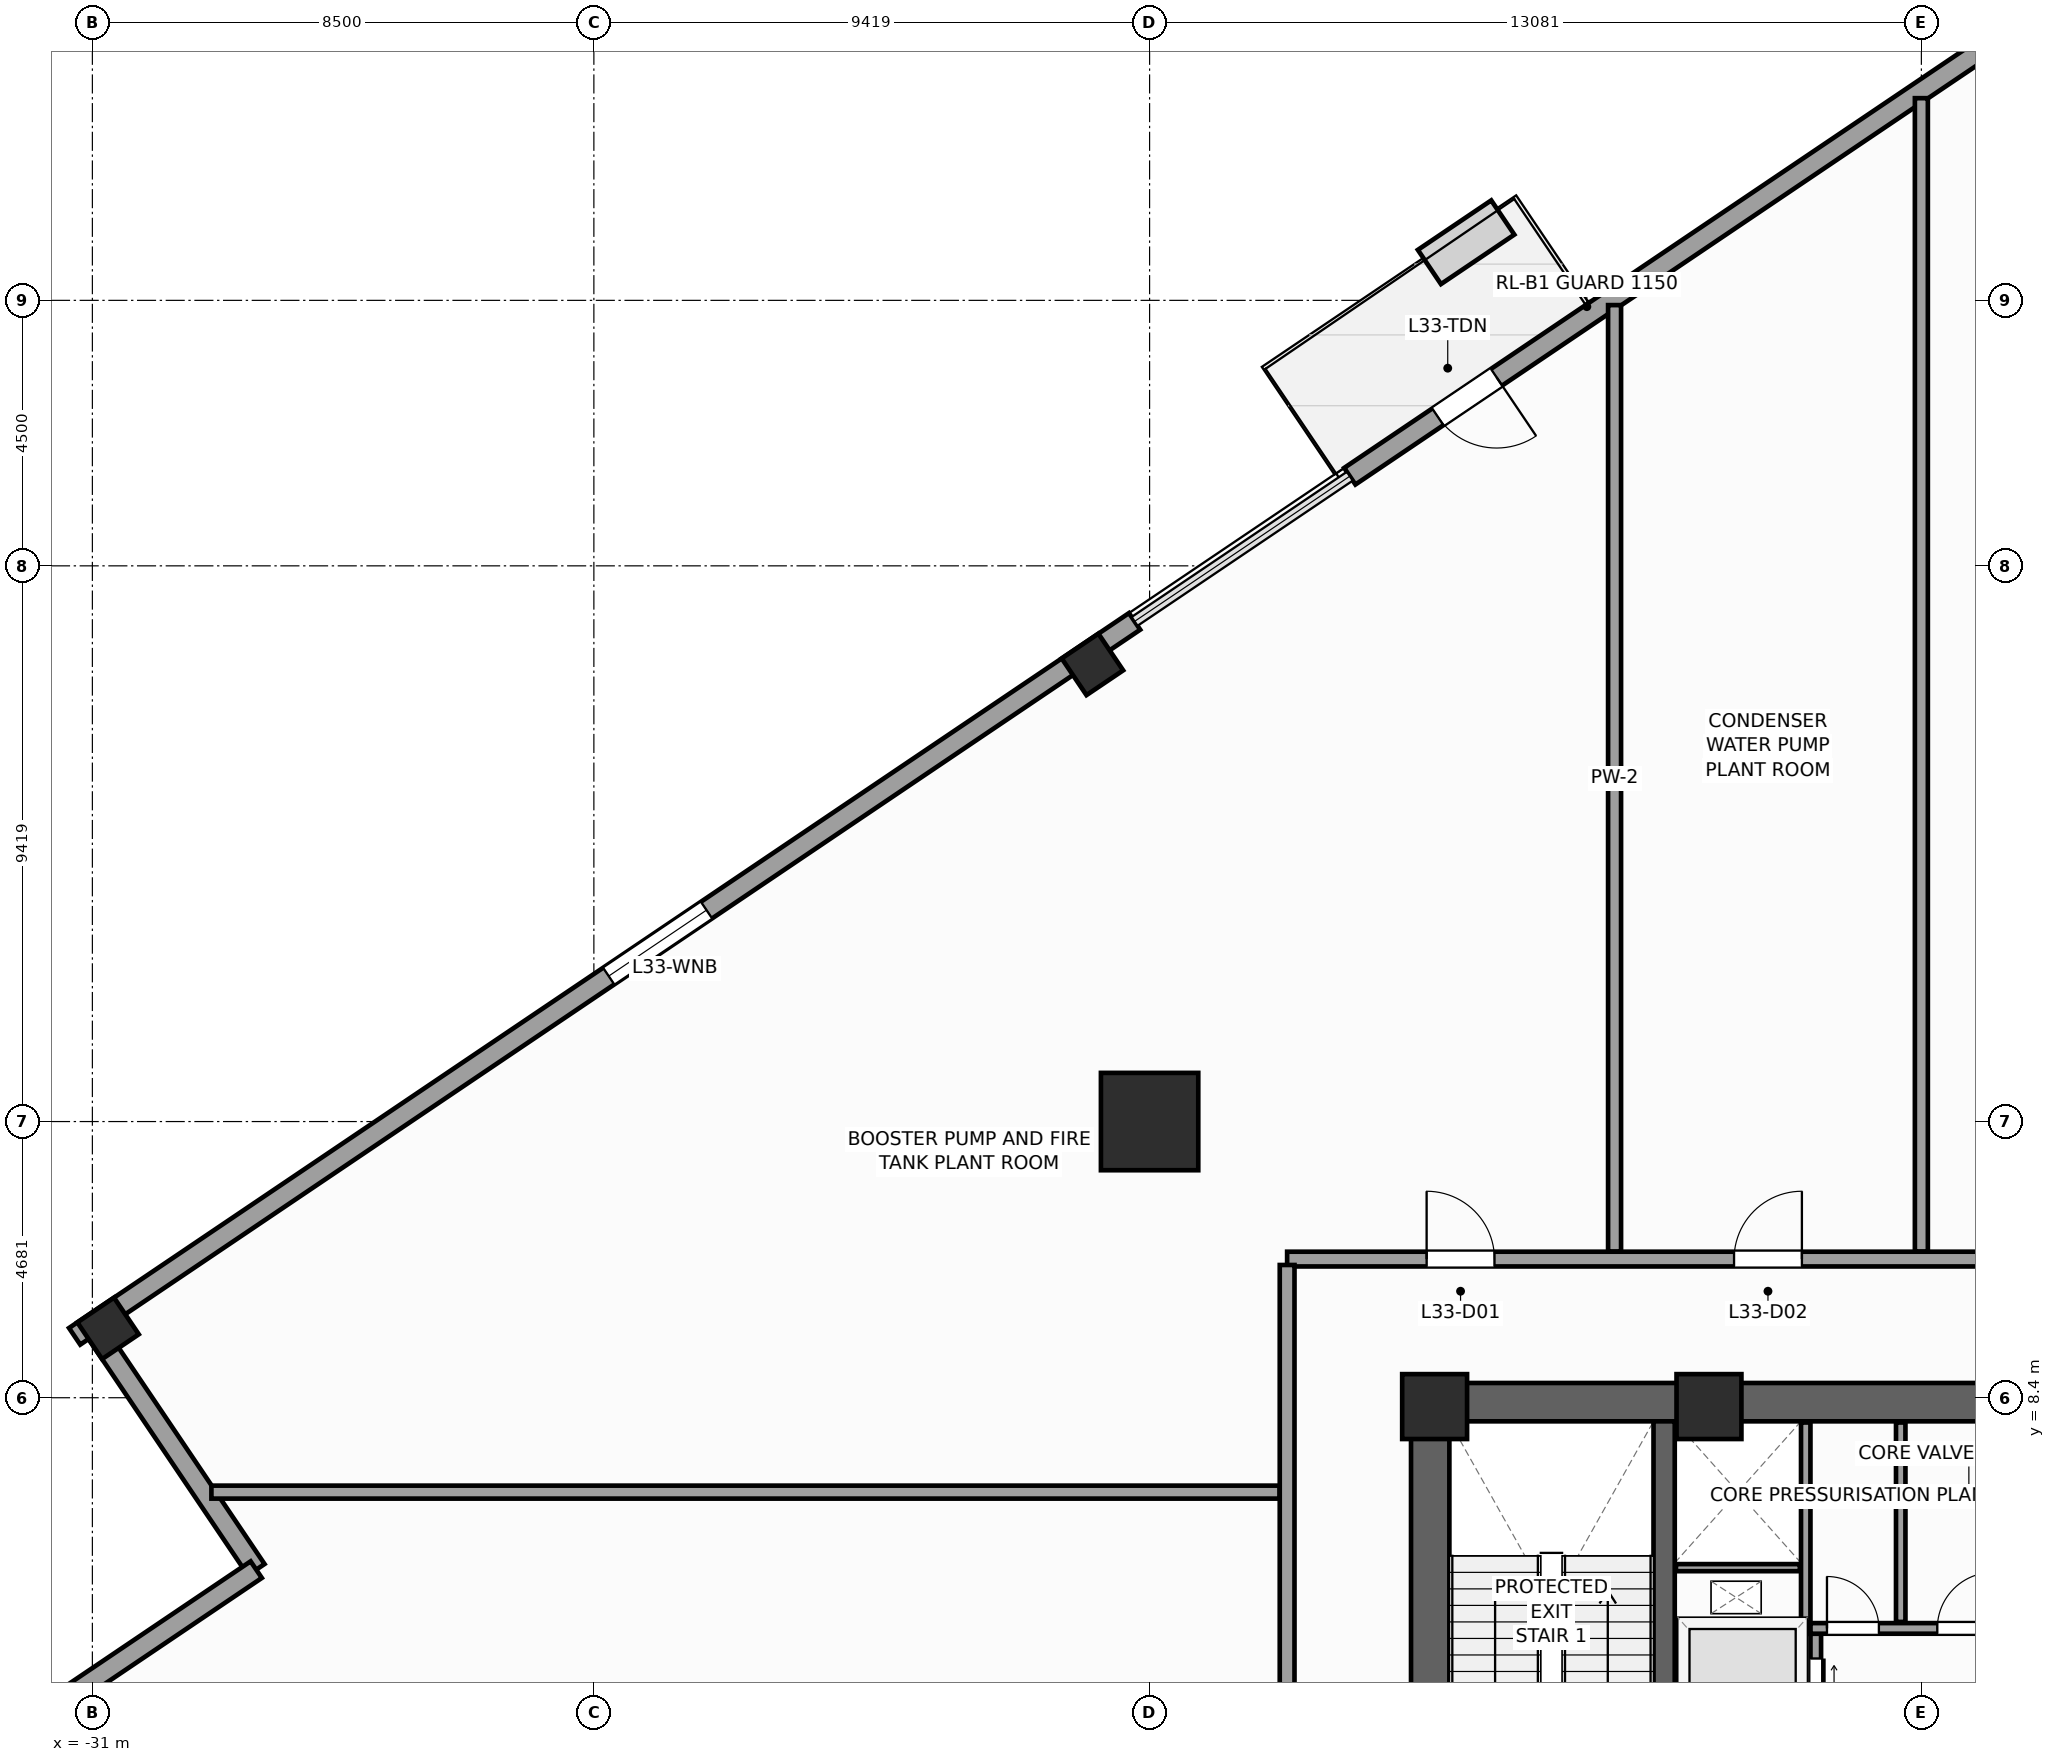
"""IFC4 building model, lengths in metres.
Left out: names, types, materials, properties, quantities, classifications, styles, units other than length and angle.
Written with IfcOpenShell. Run it as: python <this file> out.ifc"""

import sys

from ifc_helpers import new_model, si_unit, direction, frame, frame_2d, origin, origin_2d, place, context, subcontext, project, spatial, rectangle, extrude, source, transform, mapped, element, fill, save


model = new_model("IFC4")
c1 = context("Model", 3, precision=1e-05, world=origin(), true_north=direction((0.0, 1.0)))
c2 = subcontext(c1, "Body", "Model", "MODEL_VIEW")
j1 = project(units=[si_unit("LENGTHUNIT", "METRE"), si_unit("PLANEANGLEUNIT", "RADIAN")], contexts=[c1])
p1 = place(None, origin())
s1 = spatial("IfcSite", under=j1, at=p1, CompositionType="ELEMENT")
p2 = place(p1, origin())
s2 = spatial("IfcBuilding", under=s1, at=p2, CompositionType="ELEMENT")
p3 = place(p2, frame((0.0, 0.0, 139.2)))
s3 = spatial("IfcBuildingStorey", under=s2, at=p3, CompositionType="ELEMENT", Elevation=139.2)
p4 = place(p3, frame((-8.65, 8.325, 0.0), z_axis=(0.0, 0.0, 1.0), x_axis=(1.0, 0.0, 0.0)))
e1 = element("IfcWall", 1, at=p4, inside=s3, PredefinedType="SHEAR", context=c2, shape_type="SweptSolid", body=[
    extrude(rectangle(XDim=17.3, YDim=0.65, at=frame_2d((8.65, 0.0))), origin(), (0.0, 0.0, 1.0), 5.2),
])
p5 = place(p3, frame((-8.325, -8.0, 0.0), z_axis=(0.0, 0.0, 1.0), x_axis=(0.0, 1.0, 0.0)))
e2 = element("IfcWall", 2, at=p5, inside=s3, PredefinedType="SHEAR", context=c2, shape_type="SweptSolid", body=[
    extrude(rectangle(XDim=16.0, YDim=0.65, at=frame_2d((8.0, 0.0))), origin(), (0.0, 0.0, 1.0), 5.2),
])
p6 = place(p5, frame((4.69, 0.0, 0.0)))
e3 = element("IfcOpeningElement", 3, at=p6, cuts=e2, PredefinedType="OPENING", context=c2, shape_type="SweptSolid", body=[
    extrude(rectangle(XDim=1.3, YDim=2.2, at=frame_2d((0.65, 1.1))), frame((0.0, 0.335, 0.0), z_axis=(0.0, -1.0, 0.0), x_axis=(1.0, 0.0, 0.0)), (0.0, 0.0, 1.0), 0.67),
])
p7 = place(p3, frame((-4.36, -8.0, 0.0), z_axis=(0.0, 0.0, 1.0), x_axis=(0.0, 1.0, 0.0)))
e4 = element("IfcWall", 4, at=p7, inside=s3, PredefinedType="SHEAR", context=c2, shape_type="SweptSolid", body=[
    extrude(rectangle(XDim=16.0, YDim=0.36, at=frame_2d((8.0, 0.0))), origin(), (0.0, 0.0, 1.0), 5.2),
])
m1 = source(origin(), c2, "Body", "SweptSolid", [
    extrude(rectangle(XDim=1.1, YDim=1.1, at=origin_2d()), origin(), (0.0, 0.0, 1.0), 5.2),
])
for number, where, z_axis, x_axis in (
    (5, (-8.25, 8.25, 0.0), (0.0, 0.0, 1.0), (1.0, 0.0, 0.0)),
    (6, (-3.6, 8.25, 0.0), (0.0, 0.0, 1.0), (1.0, 0.0, 0.0)),
):
    element("IfcColumn", number, at=place(p3, frame(where, z_axis=z_axis, x_axis=x_axis)), inside=s3, PredefinedType="PILASTER", context=c2, shape_type="MappedRepresentation", body=[
        mapped(m1, transform((0.0, 0.0, 0.0), scale=1.0)),
    ])
m2 = source(origin(), c2, "Body", "SweptSolid", [
    extrude(rectangle(XDim=1.65, YDim=1.65, at=origin_2d()), origin(), (0.0, 0.0, 1.0), 5.2),
])
p8 = place(p3, frame((-13.081, 13.081, 0.0), z_axis=(0.0, 0.0, 1.0), x_axis=(1.0, 0.0, 0.0)))
e7 = element("IfcColumn", 7, at=p8, inside=s3, PredefinedType="COLUMN", context=c2, shape_type="MappedRepresentation", body=[
    mapped(m2, transform((0.0, 0.0, 0.0), scale=1.0)),
])
m3 = source(origin(), c2, "Body", "SweptSolid", [
    extrude(rectangle(XDim=0.75, YDim=0.75, at=origin_2d()), origin(), (0.0, 0.0, 1.0), 5.2),
])
for number, where, z_axis, x_axis in (
    (8, (-14.05, 20.83, 0.0), (0.0, 0.0, 1.0), (0.829, 0.559, 0.0)),
    (9, (-30.734, 9.576, 0.0), (0.0, 0.0, 1.0), (0.829, 0.559, 0.0)),
):
    element("IfcColumn", number, at=place(p3, frame(where, z_axis=z_axis, x_axis=x_axis)), inside=s3, PredefinedType="COLUMN", context=c2, shape_type="MappedRepresentation", body=[
        mapped(m3, transform((0.0, 0.0, 0.0), scale=1.0)),
    ])
p9 = place(p3, frame((-31.019, 9.631, 0.0), z_axis=(0.0, 0.0, 1.0), x_axis=(0.559210350234, -0.829025804298, 0.0)))
e10 = element("IfcWall", 10, at=p9, inside=s3, PredefinedType="STANDARD", context=c2, shape_type="SweptSolid", body=[
    extrude(rectangle(XDim=5.0, YDim=0.34, at=frame_2d((2.5, 0.0))), origin(), (0.0, 0.0, 1.0), 4.94),
])
p10 = place(p3, frame((-28.223, 5.486, 0.0), z_axis=(0.0, 0.0, 1.0), x_axis=(-0.82905227345, -0.559171107879, 0.0)))
e11 = element("IfcWall", 11, at=p10, inside=s3, PredefinedType="STANDARD", context=c2, shape_type="SweptSolid", body=[
    extrude(rectangle(XDim=5.17, YDim=0.34, at=frame_2d((2.585, 0.0))), origin(), (0.0, 0.0, 1.0), 4.24),
])
p11 = place(p3, frame((2.972, 32.558, 0.0), z_axis=(0.0, 0.0, 1.0), x_axis=(-0.82903231094, -0.559200704056, 0.0)))
e12 = element("IfcWall", 12, at=p11, inside=s3, PredefinedType="STANDARD", context=c2, shape_type="SweptSolid", body=[
    extrude(rectangle(XDim=15.27, YDim=0.34, at=frame_2d((7.635, 0.0))), origin(), (0.0, 0.0, 1.0), 4.34),
])
p12 = place(p11, frame((12.27, 0.0, 0.0)))
e13 = element("IfcOpeningElement", 13, at=p12, cuts=e12, PredefinedType="OPENING", context=c2, shape_type="SweptSolid", body=[
    extrude(rectangle(XDim=1.2, YDim=2.3, at=frame_2d((0.6, 1.15))), frame((0.0, 0.18, 0.0), z_axis=(0.0, -1.0, 0.0), x_axis=(1.0, 0.0, 0.0)), (0.0, 0.0, 1.0), 0.36),
])
p13 = place(p3, frame((-13.335, 21.559, 0.0), z_axis=(0.0, 0.0, 1.0), x_axis=(-0.829039576702, -0.559189932189, 0.0)))
e14 = element("IfcWall", 14, at=p13, inside=s3, PredefinedType="STANDARD", context=c2, shape_type="SweptSolid", body=[
    extrude(rectangle(XDim=21.67, YDim=0.34, at=frame_2d((10.835, 0.0))), origin(), (0.0, 0.0, 1.0), 4.24),
])
p14 = place(p13, frame((8.751, 0.0, 0.65)))
e15 = element("IfcOpeningElement", 15, at=p14, cuts=e14, PredefinedType="OPENING", context=c2, shape_type="SweptSolid", body=[
    extrude(rectangle(XDim=2.0, YDim=1.45, at=frame_2d((1.0, 0.725))), frame((0.0, 0.18, 0.0), z_axis=(0.0, -1.0, 0.0), x_axis=(1.0, 0.0, 0.0)), (0.0, 0.0, 1.0), 0.36),
])
p15 = place(p3, frame((-1.79, -7.98, 0.0), z_axis=(0.0, 0.0, 1.0), x_axis=(0.0, 1.0, 0.0)))
e16 = element("IfcWall", 16, at=p15, inside=s3, PredefinedType="PARTITIONING", context=c2, shape_type="SweptSolid", body=[
    extrude(rectangle(XDim=12.38, YDim=0.18, at=frame_2d((6.19, 0.0))), origin(), (0.0, 0.0, 1.0), 4.94),
])
p16 = place(p15, frame((4.6, 0.0, 0.0)))
e17 = element("IfcOpeningElement", 17, at=p16, cuts=e16, PredefinedType="OPENING", context=c2, shape_type="SweptSolid", body=[
    extrude(rectangle(XDim=1.1, YDim=2.2, at=frame_2d((0.55, 1.1))), frame((0.0, 0.1, 0.0), z_axis=(0.0, -1.0, 0.0), x_axis=(1.0, 0.0, 0.0)), (0.0, 0.0, 1.0), 0.2),
])
p17 = place(p15, frame((6.66, 0.0, 0.0)))
e18 = element("IfcOpeningElement", 18, at=p17, cuts=e16, PredefinedType="OPENING", context=c2, shape_type="SweptSolid", body=[
    extrude(rectangle(XDim=1.1, YDim=2.2, at=frame_2d((0.55, 1.1))), frame((0.0, 0.1, 0.0), z_axis=(0.0, -1.0, 0.0), x_axis=(1.0, 0.0, 0.0)), (0.0, 0.0, 1.0), 0.2),
])
p18 = place(p15, frame((8.8, 0.0, 0.0)))
e19 = element("IfcOpeningElement", 19, at=p18, cuts=e16, PredefinedType="OPENING", context=c2, shape_type="SweptSolid", body=[
    extrude(rectangle(XDim=1.1, YDim=2.2, at=frame_2d((0.55, 1.1))), frame((0.0, 0.1, 0.0), z_axis=(0.0, -1.0, 0.0), x_axis=(1.0, 0.0, 0.0)), (0.0, 0.0, 1.0), 0.2),
])
p19 = place(p15, frame((10.86, 0.0, 0.0)))
e20 = element("IfcOpeningElement", 20, at=p19, cuts=e16, PredefinedType="OPENING", context=c2, shape_type="SweptSolid", body=[
    extrude(rectangle(XDim=1.1, YDim=2.2, at=frame_2d((0.55, 1.1))), frame((0.0, 0.1, 0.0), z_axis=(0.0, -1.0, 0.0), x_axis=(1.0, 0.0, 0.0)), (0.0, 0.0, 1.0), 0.2),
])
p20 = place(p3, frame((-1.88, 4.49, 0.0), z_axis=(0.0, 0.0, 1.0), x_axis=(1.0, 0.0, 0.0)))
e21 = element("IfcWall", 21, at=p20, inside=s3, PredefinedType="PARTITIONING", context=c2, shape_type="SweptSolid", body=[
    extrude(rectangle(XDim=3.76, YDim=0.18, at=frame_2d((1.88, 0.0))), origin(), (0.0, 0.0, 1.0), 4.94),
])
p21 = place(p20, frame((0.28, 0.0, 0.0)))
e22 = element("IfcOpeningElement", 22, at=p21, cuts=e21, PredefinedType="OPENING", context=c2, shape_type="SweptSolid", body=[
    extrude(rectangle(XDim=0.88, YDim=2.1, at=frame_2d((0.44, 1.05))), frame((0.0, 0.1, 0.0), z_axis=(0.0, -1.0, 0.0), x_axis=(1.0, 0.0, 0.0)), (0.0, 0.0, 1.0), 0.2),
])
p22 = place(p20, frame((2.15, 0.0, 0.0)))
e23 = element("IfcOpeningElement", 23, at=p22, cuts=e21, PredefinedType="OPENING", context=c2, shape_type="SweptSolid", body=[
    extrude(rectangle(XDim=0.95, YDim=2.1, at=frame_2d((0.475, 1.05))), frame((0.0, 0.1, 0.0), z_axis=(0.0, -1.0, 0.0), x_axis=(1.0, 0.0, 0.0)), (0.0, 0.0, 1.0), 0.2),
])
p23 = place(p3, frame((-4.17, 4.49, 0.0), z_axis=(0.0, 0.0, 1.0), x_axis=(1.0, 0.0, 0.0)))
e24 = element("IfcWall", 24, at=p23, inside=s3, PredefinedType="PARTITIONING", context=c2, shape_type="SweptSolid", body=[
    extrude(rectangle(XDim=2.28, YDim=0.18, at=frame_2d((1.14, 0.0))), origin(), (0.0, 0.0, 1.0), 4.94),
])
p24 = place(p3, frame((-1.96, 4.58, 0.0), z_axis=(0.0, 0.0, 1.0), x_axis=(0.0, 1.0, 0.0)))
e25 = element("IfcWall", 25, at=p24, inside=s3, PredefinedType="PARTITIONING", context=c2, shape_type="SweptSolid", body=[
    extrude(rectangle(XDim=3.4, YDim=0.16, at=frame_2d((1.7, 0.0))), origin(), (0.0, 0.0, 1.0), 4.94),
])
p25 = place(p3, frame((-4.16, 5.52, 0.0), z_axis=(0.0, 0.0, 1.0), x_axis=(1.0, 0.0, 0.0)))
e26 = element("IfcWall", 26, at=p25, inside=s3, PredefinedType="PARTITIONING", context=c2, shape_type="SweptSolid", body=[
    extrude(rectangle(XDim=2.1, YDim=0.12, at=frame_2d((1.05, 0.0))), origin(), (0.0, 0.0, 1.0), 4.94),
])
p26 = place(p3, frame((-0.35, 4.6, 0.0), z_axis=(0.0, 0.0, 1.0), x_axis=(0.0, 1.0, 0.0)))
e27 = element("IfcWall", 27, at=p26, inside=s3, PredefinedType="PARTITIONING", context=c2, shape_type="SweptSolid", body=[
    extrude(rectangle(XDim=3.38, YDim=0.16, at=frame_2d((1.69, 0.0))), origin(), (0.0, 0.0, 1.0), 4.94),
])
p27 = place(p3, frame((-10.75, 10.75, 0.0), z_axis=(0.0, 0.0, 1.0), x_axis=(1.0, 0.0, 0.0)))
e28 = element("IfcWall", 28, at=p27, inside=s3, PredefinedType="PARTITIONING", context=c2, shape_type="SweptSolid", body=[
    extrude(rectangle(XDim=21.5, YDim=0.25, at=frame_2d((10.75, 0.0))), origin(), (0.0, 0.0, 1.0), 4.94),
])
p28 = place(p27, frame((2.365, 0.0, 0.0)))
e29 = element("IfcOpeningElement", 29, at=p28, cuts=e28, PredefinedType="OPENING", context=c2, shape_type="SweptSolid", body=[
    extrude(rectangle(XDim=1.15, YDim=2.25, at=frame_2d((0.575, 1.125))), frame((0.0, 0.135, 0.0), z_axis=(0.0, -1.0, 0.0), x_axis=(1.0, 0.0, 0.0)), (0.0, 0.0, 1.0), 0.27),
])
p29 = place(p27, frame((7.575, 0.0, 0.0)))
e30 = element("IfcOpeningElement", 30, at=p29, cuts=e28, PredefinedType="OPENING", context=c2, shape_type="SweptSolid", body=[
    extrude(rectangle(XDim=1.15, YDim=2.25, at=frame_2d((0.575, 1.125))), frame((0.0, 0.135, 0.0), z_axis=(0.0, -1.0, 0.0), x_axis=(1.0, 0.0, 0.0)), (0.0, 0.0, 1.0), 0.27),
])
p30 = place(p27, frame((12.775, 0.0, 0.0)))
e31 = element("IfcOpeningElement", 31, at=p30, cuts=e28, PredefinedType="OPENING", context=c2, shape_type="SweptSolid", body=[
    extrude(rectangle(XDim=1.15, YDim=2.25, at=frame_2d((0.575, 1.125))), frame((0.0, 0.135, 0.0), z_axis=(0.0, -1.0, 0.0), x_axis=(1.0, 0.0, 0.0)), (0.0, 0.0, 1.0), 0.27),
])
p31 = place(p27, frame((17.986, 0.0, 0.0)))
e32 = element("IfcOpeningElement", 32, at=p31, cuts=e28, PredefinedType="OPENING", context=c2, shape_type="SweptSolid", body=[
    extrude(rectangle(XDim=1.15, YDim=2.25, at=frame_2d((0.575, 1.125))), frame((0.0, 0.135, 0.0), z_axis=(0.0, -1.0, 0.0), x_axis=(1.0, 0.0, 0.0)), (0.0, 0.0, 1.0), 0.27),
])
p32 = place(p3, frame((-10.75, -10.65, 0.0), z_axis=(0.0, 0.0, 1.0), x_axis=(0.0, 1.0, 0.0)))
e33 = element("IfcWall", 33, at=p32, inside=s3, PredefinedType="PARTITIONING", context=c2, shape_type="SweptSolid", body=[
    extrude(rectangle(XDim=21.3, YDim=0.25, at=frame_2d((10.65, 0.0))), origin(), (0.0, 0.0, 1.0), 4.94),
])
p33 = place(p32, frame((8.8, 0.0, 0.0)))
e34 = element("IfcOpeningElement", 34, at=p33, cuts=e33, PredefinedType="OPENING", context=c2, shape_type="SweptSolid", body=[
    extrude(rectangle(XDim=1.15, YDim=2.25, at=frame_2d((0.575, 1.125))), frame((0.0, 0.135, 0.0), z_axis=(0.0, -1.0, 0.0), x_axis=(1.0, 0.0, 0.0)), (0.0, 0.0, 1.0), 0.27),
])
p34 = place(p3, frame((-5.2, 10.88, 0.0), z_axis=(0.0, 0.0, 1.0), x_axis=(0.0, 1.0, 0.0)))
e35 = element("IfcWall", 35, at=p34, inside=s3, PredefinedType="PARTITIONING", context=c2, shape_type="SweptSolid", body=[
    extrude(rectangle(XDim=16.04, YDim=0.22, at=frame_2d((8.02, 0.0))), origin(), (0.0, 0.0, 1.0), 4.94),
])
p35 = place(p3, frame((0.0, 10.88, 0.0), z_axis=(0.0, 0.0, 1.0), x_axis=(0.0, 1.0, 0.0)))
e36 = element("IfcWall", 36, at=p35, inside=s3, PredefinedType="PARTITIONING", context=c2, shape_type="SweptSolid", body=[
    extrude(rectangle(XDim=19.547, YDim=0.22, at=frame_2d((9.773, 0.0))), origin(), (0.0, 0.0, 1.0), 4.94),
])
p36 = place(p3, frame((-10.88, 6.8, 0.0), z_axis=(0.0, 0.0, 1.0), x_axis=(-1.0, 0.0, 0.0)))
e37 = element("IfcWall", 37, at=p36, inside=s3, PredefinedType="PARTITIONING", context=c2, shape_type="SweptSolid", body=[
    extrude(rectangle(XDim=18.103, YDim=0.22, at=frame_2d((9.051, 0.0))), origin(), (0.0, 0.0, 1.0), 4.94),
])
m4 = source(origin(), c2, "Body", "SweptSolid", [
    extrude(rectangle(XDim=2.0, YDim=1.45, at=frame_2d((1.0, 0.725))), frame((0.0, 0.03, 0.0), z_axis=(0.0, -1.0, 0.0), x_axis=(1.0, 0.0, 0.0)), (0.0, 0.0, 1.0), 0.06),
])
p37 = place(p14, origin())
e38 = element("IfcWindow", 38, at=p37, inside=s3, PartitioningType="SINGLE_PANEL", PredefinedType="WINDOW", context=c2, shape_type="MappedRepresentation", body=[
    mapped(m4, transform((0.0, 0.0, 0.0), scale=1.0)),
])
fill(e15, e38)
m5 = source(origin(), c2, "Body", "SweptSolid", [
    extrude(rectangle(XDim=1.2, YDim=2.3, at=frame_2d((0.6, 1.15))), frame((0.0, 0.025, 0.0), z_axis=(0.0, -1.0, 0.0), x_axis=(1.0, 0.0, 0.0)), (0.0, 0.0, 1.0), 0.05),
])
p38 = place(p12, origin())
e39 = element("IfcDoor", 39, at=p38, inside=s3, OperationType="SINGLE_SWING_LEFT", PredefinedType="DOOR", context=c2, shape_type="MappedRepresentation", body=[
    mapped(m5, transform((0.0, 0.0, 0.0), scale=1.0)),
])
fill(e13, e39)
m6 = source(origin(), c2, "Body", "SweptSolid", [
    extrude(rectangle(XDim=1.1, YDim=2.2, at=frame_2d((0.55, 1.1))), frame((0.0, 0.025, 0.0), z_axis=(0.0, -1.0, 0.0), x_axis=(1.0, 0.0, 0.0)), (0.0, 0.0, 1.0), 0.05),
])
p39 = place(p19, frame((1.1, 0.0, 0.0), z_axis=(0.0, 0.0, 1.0), x_axis=(-1.0, 0.0, 0.0)))
e40 = element("IfcDoor", 40, at=p39, inside=s3, OperationType="DOUBLE_DOOR_SLIDING", PredefinedType="DOOR", context=c2, shape_type="MappedRepresentation", body=[
    mapped(m6, transform((0.0, 0.0, 0.0), scale=1.0)),
])
fill(e20, e40)
m7 = source(origin(), c2, "Body", "SweptSolid", [
    extrude(rectangle(XDim=0.88, YDim=2.1, at=frame_2d((0.44, 1.05))), frame((0.0, 0.025, 0.0), z_axis=(0.0, -1.0, 0.0), x_axis=(1.0, 0.0, 0.0)), (0.0, 0.0, 1.0), 0.05),
])
p40 = place(p21, origin())
e41 = element("IfcDoor", 41, at=p40, inside=s3, OperationType="SINGLE_SWING_LEFT", PredefinedType="DOOR", context=c2, shape_type="MappedRepresentation", body=[
    mapped(m7, transform((0.0, 0.0, 0.0), scale=1.0)),
])
fill(e22, e41)
m8 = source(origin(), c2, "Body", "SweptSolid", [
    extrude(rectangle(XDim=0.95, YDim=2.1, at=frame_2d((0.475, 1.05))), frame((0.0, 0.025, 0.0), z_axis=(0.0, -1.0, 0.0), x_axis=(1.0, 0.0, 0.0)), (0.0, 0.0, 1.0), 0.05),
])
p41 = place(p22, origin())
e42 = element("IfcDoor", 42, at=p41, inside=s3, OperationType="SINGLE_SWING_RIGHT", PredefinedType="DOOR", context=c2, shape_type="MappedRepresentation", body=[
    mapped(m8, transform((0.0, 0.0, 0.0), scale=1.0)),
])
fill(e23, e42)
m9 = source(origin(), c2, "Body", "SweptSolid", [
    extrude(rectangle(XDim=1.15, YDim=2.25, at=frame_2d((0.575, 1.125))), frame((0.0, 0.025, 0.0), z_axis=(0.0, -1.0, 0.0), x_axis=(1.0, 0.0, 0.0)), (0.0, 0.0, 1.0), 0.05),
])
p42 = place(p28, origin())
e43 = element("IfcDoor", 43, at=p42, inside=s3, OperationType="SINGLE_SWING_LEFT", PredefinedType="DOOR", context=c2, shape_type="MappedRepresentation", body=[
    mapped(m9, transform((0.0, 0.0, 0.0), scale=1.0)),
])
fill(e29, e43)
p43 = place(p29, origin())
e44 = element("IfcDoor", 44, at=p43, inside=s3, OperationType="SINGLE_SWING_RIGHT", PredefinedType="DOOR", context=c2, shape_type="MappedRepresentation", body=[
    mapped(m9, transform((0.0, 0.0, 0.0), scale=1.0)),
])
fill(e30, e44)
save(model, sys.argv[1])
